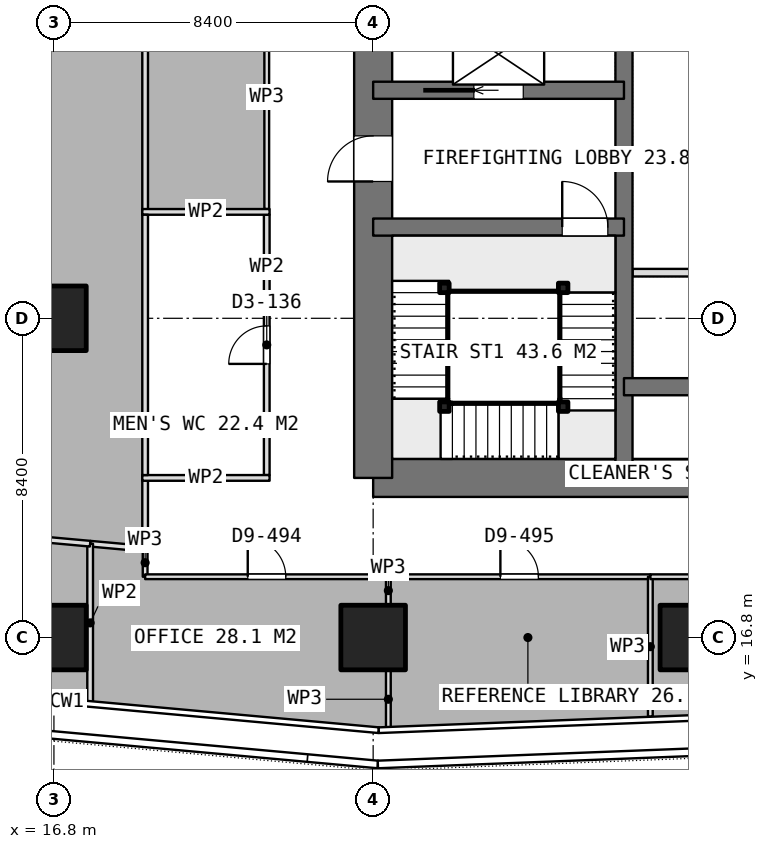
"""IFC4 building model, lengths in metres.
Left out: names, types, materials, properties, quantities, classifications, styles, units other than length and angle.
Written with IfcOpenShell. Run it as: python <this file> out.ifc"""

import sys

from ifc_helpers import new_model, si_unit, direction, frame, frame_2d, origin, origin_2d, place, context, subcontext, project, spatial, rectangle, extrude, element, fill, save


model = new_model("IFC4")
c1 = context("Model", 3, precision=1e-05, world=origin(), true_north=direction((0.0, 1.0)))
c2 = subcontext(c1, "Body", "Model", "MODEL_VIEW")
j1 = project(units=[si_unit("LENGTHUNIT", "METRE"), si_unit("PLANEANGLEUNIT", "RADIAN")], contexts=[c1])
p1 = place(None, origin())
s1 = spatial("IfcSite", under=j1, at=p1, CompositionType="ELEMENT")
p2 = place(p1, origin())
s2 = spatial("IfcBuilding", under=s1, at=p2, CompositionType="ELEMENT")
p3 = place(p2, frame((0.0, 0.0, 129.05)))
s3 = spatial("IfcBuildingStorey", under=s2, at=p3, CompositionType="ELEMENT", Elevation=129.05)
p4 = place(p3, frame((25.2, 21.0, 0.0), z_axis=(0.0, 0.0, 1.0), x_axis=(1.0, 0.0, 0.0)))
e1 = element("IfcWall", 1, at=p4, inside=s3, PredefinedType="SHEAR", context=c2, shape_type="SweptSolid", body=[
    extrude(rectangle(XDim=10.4, YDim=1.0, at=frame_2d((5.2, 0.0))), origin(), (0.0, 0.0, 1.0), 3.75),
])
p5 = place(p3, frame((25.2, 21.0, 0.0), z_axis=(0.0, 0.0, 1.0), x_axis=(0.0, 1.0, 0.0)))
e2 = element("IfcWall", 2, at=p5, inside=s3, PredefinedType="SHEAR", context=c2, shape_type="SweptSolid", body=[
    extrude(rectangle(XDim=25.2, YDim=1.0, at=frame_2d((12.6, 0.0))), origin(), (0.0, 0.0, 1.0), 3.75),
])
p6 = place(p5, frame((7.8, 0.0, 0.0)))
e3 = element("IfcOpeningElement", 3, at=p6, cuts=e2, PredefinedType="OPENING", context=c2, shape_type="SweptSolid", body=[
    extrude(rectangle(XDim=1.2, YDim=2.1, at=frame_2d((0.6, 1.05))), frame((0.0, 0.51, 0.0), z_axis=(0.0, -1.0, 0.0), x_axis=(1.0, 0.0, 0.0)), (0.0, 0.0, 1.0), 1.02),
])
p7 = place(p5, frame((14.25, 0.0, 0.0)))
e4 = element("IfcOpeningElement", 4, at=p7, cuts=e2, PredefinedType="OPENING", context=c2, shape_type="SweptSolid", body=[
    extrude(rectangle(XDim=0.9, YDim=2.1, at=frame_2d((0.45, 1.05))), frame((0.0, 0.51, 0.0), z_axis=(0.0, -1.0, 0.0), x_axis=(1.0, 0.0, 0.0)), (0.0, 0.0, 1.0), 1.02),
])
p8 = place(p5, frame((16.85, 0.0, 0.0)))
e5 = element("IfcOpeningElement", 5, at=p8, cuts=e2, PredefinedType="OPENING", context=c2, shape_type="SweptSolid", body=[
    extrude(rectangle(XDim=0.9, YDim=2.1, at=frame_2d((0.45, 1.05))), frame((0.0, 0.51, 0.0), z_axis=(0.0, -1.0, 0.0), x_axis=(1.0, 0.0, 0.0)), (0.0, 0.0, 1.0), 1.02),
])
p9 = place(p5, frame((19.025, 0.0, 0.0)))
e6 = element("IfcOpeningElement", 6, at=p9, cuts=e2, PredefinedType="OPENING", context=c2, shape_type="SweptSolid", body=[
    extrude(rectangle(XDim=1.2, YDim=2.1, at=frame_2d((0.6, 1.05))), frame((0.0, 0.51, 0.0), z_axis=(0.0, -1.0, 0.0), x_axis=(1.0, 0.0, 0.0)), (0.0, 0.0, 1.0), 1.02),
])
p10 = place(p3, frame((31.8, 21.0, 0.0), z_axis=(0.0, 0.0, 1.0), x_axis=(0.0, 1.0, 0.0)))
e7 = element("IfcWall", 7, at=p10, inside=s3, PredefinedType="SHEAR", context=c2, shape_type="SweptSolid", body=[
    extrude(rectangle(XDim=25.2, YDim=0.45, at=frame_2d((12.6, 0.0))), origin(), (0.0, 0.0, 1.0), 3.75),
])
p11 = place(p3, frame((31.8, 23.4, 0.0), z_axis=(0.0, 0.0, 1.0), x_axis=(1.0, 0.0, 0.0)))
e8 = element("IfcWall", 8, at=p11, inside=s3, PredefinedType="SHEAR", context=c2, shape_type="SweptSolid", body=[
    extrude(rectangle(XDim=3.8, YDim=0.45, at=frame_2d((1.9, 0.0))), origin(), (0.0, 0.0, 1.0), 3.75),
])
p12 = place(p3, frame((25.2, 27.6, 0.0), z_axis=(0.0, 0.0, 1.0), x_axis=(1.0, 0.0, 0.0)))
e9 = element("IfcWall", 9, at=p12, inside=s3, PredefinedType="SHEAR", context=c2, shape_type="SweptSolid", body=[
    extrude(rectangle(XDim=6.6, YDim=0.45, at=frame_2d((3.3, 0.0))), origin(), (0.0, 0.0, 1.0), 3.75),
])
p13 = place(p12, frame((4.975, 0.0, 0.0)))
e10 = element("IfcOpeningElement", 10, at=p13, cuts=e9, PredefinedType="OPENING", context=c2, shape_type="SweptSolid", body=[
    extrude(rectangle(XDim=1.2, YDim=2.1, at=frame_2d((0.6, 1.05))), frame((0.0, 0.235, 0.0), z_axis=(0.0, -1.0, 0.0), x_axis=(1.0, 0.0, 0.0)), (0.0, 0.0, 1.0), 0.47),
])
p14 = place(p3, frame((25.2, 31.2, 0.0), z_axis=(0.0, 0.0, 1.0), x_axis=(1.0, 0.0, 0.0)))
e11 = element("IfcWall", 11, at=p14, inside=s3, PredefinedType="SHEAR", context=c2, shape_type="SweptSolid", body=[
    extrude(rectangle(XDim=6.6, YDim=0.45, at=frame_2d((3.3, 0.0))), origin(), (0.0, 0.0, 1.0), 3.75),
])
p15 = place(p14, frame((2.65, 0.0, 0.0)))
e12 = element("IfcOpeningElement", 12, at=p15, cuts=e11, PredefinedType="OPENING", context=c2, shape_type="SweptSolid", body=[
    extrude(rectangle(XDim=1.3, YDim=2.1, at=frame_2d((0.65, 1.05))), frame((0.0, 0.235, 0.0), z_axis=(0.0, -1.0, 0.0), x_axis=(1.0, 0.0, 0.0)), (0.0, 0.0, 1.0), 0.47),
])
for number, where, z_axis, x_axis in (
    (13, (16.8, 16.8, 0.0), (0.0, 0.0, 1.0), (1.0, 0.0, 0.0)),
    (14, (16.8, 25.2, 0.0), (0.0, 0.0, 1.0), (1.0, 0.0, 0.0)),
    (15, (25.2, 16.8, 0.0), (0.0, 0.0, 1.0), (1.0, 0.0, 0.0)),
    (16, (33.6, 16.8, 0.0), (0.0, 0.0, 1.0), (1.0, 0.0, 0.0)),
):
    element("IfcColumn", number, at=place(p3, frame(where, z_axis=z_axis, x_axis=x_axis)), inside=s3, PredefinedType="COLUMN", context=c2, shape_type="SweptSolid", body=[
        extrude(rectangle(XDim=1.7, YDim=1.7, at=origin_2d()), origin(), (0.0, 0.0, 1.0), 3.75),
    ])
for number, where, z_axis, x_axis in (
    (17, (32.025, 26.4, 0.0), (0.0, 0.0, 1.0), (1.0, 0.0, 0.0)),
    (18, (32.025, 29.4, 0.0), (0.0, 0.0, 1.0), (1.0, 0.0, 0.0)),
):
    element("IfcWall", number, at=place(p3, frame(where, z_axis=z_axis, x_axis=x_axis)), inside=s3, PredefinedType="PARTITIONING", context=c2, shape_type="SweptSolid", body=[
        extrude(rectangle(XDim=3.35, YDim=0.2, at=frame_2d((1.675, 0.0))), origin(), (0.0, 0.0, 1.0), 3.5),
    ])
for number, where, z_axis, x_axis in (
    (19, (19.125, 21.0, 0.0), (0.0, 0.0, 1.0), (1.0, 0.0, 0.0)),
    (20, (19.125, 28.0, 0.0), (0.0, 0.0, 1.0), (1.0, 0.0, 0.0)),
):
    element("IfcWall", number, at=place(p3, frame(where, z_axis=z_axis, x_axis=x_axis)), inside=s3, PredefinedType="PARTITIONING", context=c2, shape_type="SweptSolid", body=[
        extrude(rectangle(XDim=3.35, YDim=0.15, at=frame_2d((1.675, 0.0))), origin(), (0.0, 0.0, 1.0), 3.5),
    ])
p16 = place(p3, frame((19.2, 21.075, 0.0), z_axis=(0.0, 0.0, 1.0), x_axis=(0.0, 1.0, 0.0)))
e21 = element("IfcWall", 21, at=p16, inside=s3, PredefinedType="PARTITIONING", context=c2, shape_type="SweptSolid", body=[
    extrude(rectangle(XDim=6.85, YDim=0.15, at=frame_2d((3.425, 0.0))), origin(), (0.0, 0.0, 1.0), 3.5),
])
p17 = place(p3, frame((22.4, 21.075, 0.0), z_axis=(0.0, 0.0, 1.0), x_axis=(0.0, 1.0, 0.0)))
e22 = element("IfcWall", 22, at=p17, inside=s3, PredefinedType="PARTITIONING", context=c2, shape_type="SweptSolid", body=[
    extrude(rectangle(XDim=6.85, YDim=0.15, at=frame_2d((3.425, 0.0))), origin(), (0.0, 0.0, 1.0), 3.5),
])
p18 = place(p17, frame((2.925, 0.0, 0.0)))
e23 = element("IfcOpeningElement", 23, at=p18, cuts=e22, PredefinedType="OPENING", context=c2, shape_type="SweptSolid", body=[
    extrude(rectangle(XDim=1.0, YDim=2.1, at=frame_2d((0.5, 1.05))), frame((0.0, 0.085, 0.0), z_axis=(0.0, -1.0, 0.0), x_axis=(1.0, 0.0, 0.0)), (0.0, 0.0, 1.0), 0.17),
])
p19 = place(p3, frame((19.2, 42.873, 0.0), z_axis=(0.0, 0.0, 1.0), x_axis=(0.0, -1.0, 0.0)))
e24 = element("IfcWall", 24, at=p19, inside=s3, PredefinedType="PARTITIONING", context=c2, shape_type="SweptSolid", body=[
    extrude(rectangle(XDim=14.948, YDim=0.15, at=frame_2d((7.474, 0.0))), origin(), (0.0, 0.0, 1.0), 3.5),
])
p20 = place(p3, frame((19.2, 21.075, 0.0), z_axis=(0.0, 0.0, 1.0), x_axis=(0.0, -1.0, 0.0)))
e25 = element("IfcWall", 25, at=p20, inside=s3, PredefinedType="PARTITIONING", context=c2, shape_type="SweptSolid", body=[
    extrude(rectangle(XDim=1.937, YDim=0.15, at=frame_2d((0.969, 0.0))), origin(), (0.0, 0.0, 1.0), 3.5),
])
p21 = place(p3, frame((19.2, 19.138, 0.0), z_axis=(0.0, 0.0, 1.0), x_axis=(-0.995920706464, 0.090232734836, 0.0)))
e26 = element("IfcWall", 26, at=p21, inside=s3, PredefinedType="PARTITIONING", context=c2, shape_type="SweptSolid", body=[
    extrude(rectangle(XDim=1.453, YDim=0.15, at=frame_2d((0.727, 0.0))), origin(), (0.0, 0.0, 1.0), 3.5),
])
p22 = place(p3, frame((17.753, 19.269, 0.0), z_axis=(0.0, 0.0, 1.0), x_axis=(0.0, -1.0, 0.0)))
e27 = element("IfcWall", 27, at=p22, inside=s3, PredefinedType="PARTITIONING", context=c2, shape_type="SweptSolid", body=[
    extrude(rectangle(XDim=4.167, YDim=0.15, at=frame_2d((2.083, 0.0))), origin(), (0.0, 0.0, 1.0), 3.5),
])
p23 = place(p3, frame((17.752, 19.269, 0.0), z_axis=(0.0, 0.0, 1.0), x_axis=(-0.995896565077, 0.090498793736, 0.0)))
e28 = element("IfcWall", 28, at=p23, inside=s3, PredefinedType="PARTITIONING", context=c2, shape_type="SweptSolid", body=[
    extrude(rectangle(XDim=6.553, YDim=0.15, at=frame_2d((3.276, 0.0))), origin(), (0.0, 0.0, 1.0), 3.5),
])
p24 = place(p23, frame((2.776, 0.0, 0.0)))
e29 = element("IfcOpeningElement", 29, at=p24, cuts=e28, PredefinedType="OPENING", context=c2, shape_type="SweptSolid", body=[
    extrude(rectangle(XDim=1.0, YDim=2.1, at=frame_2d((0.5, 1.05))), frame((0.0, 0.085, 0.0), z_axis=(0.0, -1.0, 0.0), x_axis=(1.0, 0.0, 0.0)), (0.0, 0.0, 1.0), 0.17),
])
p25 = place(p3, frame((19.2, 19.138, 0.0), z_axis=(0.0, 0.0, 1.0), x_axis=(0.0, -1.0, 0.0)))
e30 = element("IfcWall", 30, at=p25, inside=s3, PredefinedType="PARTITIONING", context=c2, shape_type="SweptSolid", body=[
    extrude(rectangle(XDim=0.738, YDim=0.125, at=frame_2d((0.369, 0.0))), origin(), (0.0, 0.0, 1.0), 3.5),
])
p26 = place(p3, frame((19.2, 18.4, 0.0), z_axis=(0.0, 0.0, 1.0), x_axis=(1.0, 0.0, 0.0)))
e31 = element("IfcWall", 31, at=p26, inside=s3, PredefinedType="PARTITIONING", context=c2, shape_type="SweptSolid", body=[
    extrude(rectangle(XDim=6.4, YDim=0.125, at=frame_2d((3.2, 0.0))), origin(), (0.0, 0.0, 1.0), 3.5),
])
p27 = place(p26, frame((2.7, 0.0, 0.0)))
e32 = element("IfcOpeningElement", 32, at=p27, cuts=e31, PredefinedType="OPENING", context=c2, shape_type="SweptSolid", body=[
    extrude(rectangle(XDim=1.0, YDim=2.1, at=frame_2d((0.5, 1.05))), frame((0.0, 0.073, 0.0), z_axis=(0.0, -1.0, 0.0), x_axis=(1.0, 0.0, 0.0)), (0.0, 0.0, 1.0), 0.145),
])
p28 = place(p3, frame((25.6, 18.4, 0.0), z_axis=(0.0, 0.0, 1.0), x_axis=(0.0, -1.0, 0.0)))
e33 = element("IfcWall", 33, at=p28, inside=s3, PredefinedType="PARTITIONING", context=c2, shape_type="SweptSolid", body=[
    extrude(rectangle(XDim=0.73, YDim=0.125, at=frame_2d((0.365, 0.0))), origin(), (0.0, 0.0, 1.0), 3.5),
])
p29 = place(p3, frame((25.6, 15.93, 0.0), z_axis=(0.0, 0.0, 1.0), x_axis=(0.0, -1.0, 0.0)))
e34 = element("IfcWall", 34, at=p29, inside=s3, PredefinedType="PARTITIONING", context=c2, shape_type="SweptSolid", body=[
    extrude(rectangle(XDim=1.508, YDim=0.125, at=frame_2d((0.754, 0.0))), origin(), (0.0, 0.0, 1.0), 3.5),
])
p30 = place(p3, frame((25.601, 18.4, 0.0), z_axis=(0.0, 0.0, 1.0), x_axis=(1.0, 0.0, 0.0)))
e35 = element("IfcWall", 35, at=p30, inside=s3, PredefinedType="PARTITIONING", context=c2, shape_type="SweptSolid", body=[
    extrude(rectangle(XDim=6.893, YDim=0.125, at=frame_2d((3.446, 0.0))), origin(), (0.0, 0.0, 1.0), 3.5),
])
p31 = place(p30, frame((2.947, 0.0, 0.0)))
e36 = element("IfcOpeningElement", 36, at=p31, cuts=e35, PredefinedType="OPENING", context=c2, shape_type="SweptSolid", body=[
    extrude(rectangle(XDim=1.0, YDim=2.1, at=frame_2d((0.5, 1.05))), frame((0.0, 0.073, 0.0), z_axis=(0.0, -1.0, 0.0), x_axis=(1.0, 0.0, 0.0)), (0.0, 0.0, 1.0), 0.145),
])
p32 = place(p3, frame((32.494, 18.4, 0.0), z_axis=(0.0, 0.0, 1.0), x_axis=(0.0, -1.0, 0.0)))
e37 = element("IfcWall", 37, at=p32, inside=s3, PredefinedType="PARTITIONING", context=c2, shape_type="SweptSolid", body=[
    extrude(rectangle(XDim=3.68, YDim=0.125, at=frame_2d((1.84, 0.0))), origin(), (0.0, 0.0, 1.0), 3.5),
])
p33 = place(p3, frame((32.495, 18.4, 0.0), z_axis=(0.0, 0.0, 1.0), x_axis=(1.0, 0.0, 0.0)))
e38 = element("IfcWall", 38, at=p33, inside=s3, PredefinedType="PARTITIONING", context=c2, shape_type="SweptSolid", body=[
    extrude(rectangle(XDim=7.905, YDim=0.125, at=frame_2d((3.952, 0.0))), origin(), (0.0, 0.0, 1.0), 3.5),
])
p34 = place(p33, frame((3.453, 0.0, 0.0)))
e39 = element("IfcOpeningElement", 39, at=p34, cuts=e38, PredefinedType="OPENING", context=c2, shape_type="SweptSolid", body=[
    extrude(rectangle(XDim=1.0, YDim=2.1, at=frame_2d((0.5, 1.05))), frame((0.0, 0.073, 0.0), z_axis=(0.0, -1.0, 0.0), x_axis=(1.0, 0.0, 0.0)), (0.0, 0.0, 1.0), 0.145),
])
p35 = place(p3, frame((22.4, 42.872, 0.0), z_axis=(0.0, 0.0, 1.0), x_axis=(0.0, -1.0, 0.0)))
e40 = element("IfcWall", 40, at=p35, inside=s3, PredefinedType="PARTITIONING", context=c2, shape_type="SweptSolid", body=[
    extrude(rectangle(XDim=14.797, YDim=0.125, at=frame_2d((7.398, 0.0))), origin(), (0.0, 0.0, 1.0), 3.5),
])
p36 = place(p35, frame((6.536, 0.0, 0.0)))
e41 = element("IfcOpeningElement", 41, at=p36, cuts=e40, PredefinedType="OPENING", context=c2, shape_type="SweptSolid", body=[
    extrude(rectangle(XDim=1.8, YDim=2.1, at=frame_2d((0.9, 1.05))), frame((0.0, 0.073, 0.0), z_axis=(0.0, -1.0, 0.0), x_axis=(1.0, 0.0, 0.0)), (0.0, 0.0, 1.0), 0.145),
])
for number, where, z_axis, x_axis in (
    (42, (30.2, 26.0, 0.0), (0.0, 0.0, 1.0), (1.0, 0.0, 0.0)),
    (43, (30.2, 22.875, 0.0), (0.0, 0.0, 1.0), (1.0, 0.0, 0.0)),
    (44, (27.075, 22.875, 0.0), (0.0, 0.0, 1.0), (1.0, 0.0, 0.0)),
    (45, (27.075, 26.0, 0.0), (0.0, 0.0, 1.0), (1.0, 0.0, 0.0)),
):
    element("IfcColumn", number, at=place(p3, frame(where, z_axis=z_axis, x_axis=x_axis)), inside=s3, PredefinedType="COLUMN", context=c2, shape_type="SweptSolid", body=[
        extrude(rectangle(XDim=0.25, YDim=0.25, at=origin_2d()), origin(), (0.0, 0.0, 1.0), 3.75),
    ])
p37 = place(p6, origin())
e46 = element("IfcDoor", 46, at=p37, inside=s3, OperationType="SINGLE_SWING_LEFT", PredefinedType="DOOR", context=c2, shape_type="SweptSolid", body=[
    extrude(rectangle(XDim=1.2, YDim=2.1, at=frame_2d((0.6, 1.05))), frame((0.0, 0.025, 0.0), z_axis=(0.0, -1.0, 0.0), x_axis=(1.0, 0.0, 0.0)), (0.0, 0.0, 1.0), 0.05),
])
fill(e3, e46)
p38 = place(p15, origin())
e47 = element("IfcDoor", 47, at=p38, inside=s3, OperationType="SLIDING_TO_LEFT", PredefinedType="USERDEFINED", context=c2, shape_type="SweptSolid", body=[
    extrude(rectangle(XDim=1.3, YDim=2.1, at=frame_2d((0.65, 1.05))), frame((0.0, 0.025, 0.0), z_axis=(0.0, -1.0, 0.0), x_axis=(1.0, 0.0, 0.0)), (0.0, 0.0, 1.0), 0.05),
])
fill(e12, e47)
p39 = place(p18, origin())
e48 = element("IfcDoor", 48, at=p39, inside=s3, OperationType="SINGLE_SWING_LEFT", PredefinedType="DOOR", context=c2, shape_type="SweptSolid", body=[
    extrude(rectangle(XDim=1.0, YDim=2.1, at=frame_2d((0.5, 1.05))), frame((0.0, 0.025, 0.0), z_axis=(0.0, -1.0, 0.0), x_axis=(1.0, 0.0, 0.0)), (0.0, 0.0, 1.0), 0.05),
])
fill(e23, e48)
p40 = place(p27, origin())
e49 = element("IfcDoor", 49, at=p40, inside=s3, OperationType="SINGLE_SWING_LEFT", PredefinedType="DOOR", context=c2, shape_type="SweptSolid", body=[
    extrude(rectangle(XDim=1.0, YDim=2.1, at=frame_2d((0.5, 1.05))), frame((0.0, 0.025, 0.0), z_axis=(0.0, -1.0, 0.0), x_axis=(1.0, 0.0, 0.0)), (0.0, 0.0, 1.0), 0.05),
])
fill(e32, e49)
p41 = place(p31, origin())
e50 = element("IfcDoor", 50, at=p41, inside=s3, OperationType="SINGLE_SWING_LEFT", PredefinedType="DOOR", context=c2, shape_type="SweptSolid", body=[
    extrude(rectangle(XDim=1.0, YDim=2.1, at=frame_2d((0.5, 1.05))), frame((0.0, 0.025, 0.0), z_axis=(0.0, -1.0, 0.0), x_axis=(1.0, 0.0, 0.0)), (0.0, 0.0, 1.0), 0.05),
])
fill(e36, e50)
p42 = place(p13, origin())
e51 = element("IfcDoor", 51, at=p42, inside=s3, OperationType="SINGLE_SWING_RIGHT", PredefinedType="DOOR", context=c2, shape_type="SweptSolid", body=[
    extrude(rectangle(XDim=1.2, YDim=2.1, at=frame_2d((0.6, 1.05))), frame((0.0, 0.025, 0.0), z_axis=(0.0, -1.0, 0.0), x_axis=(1.0, 0.0, 0.0)), (0.0, 0.0, 1.0), 0.05),
])
fill(e10, e51)
save(model, sys.argv[1])
